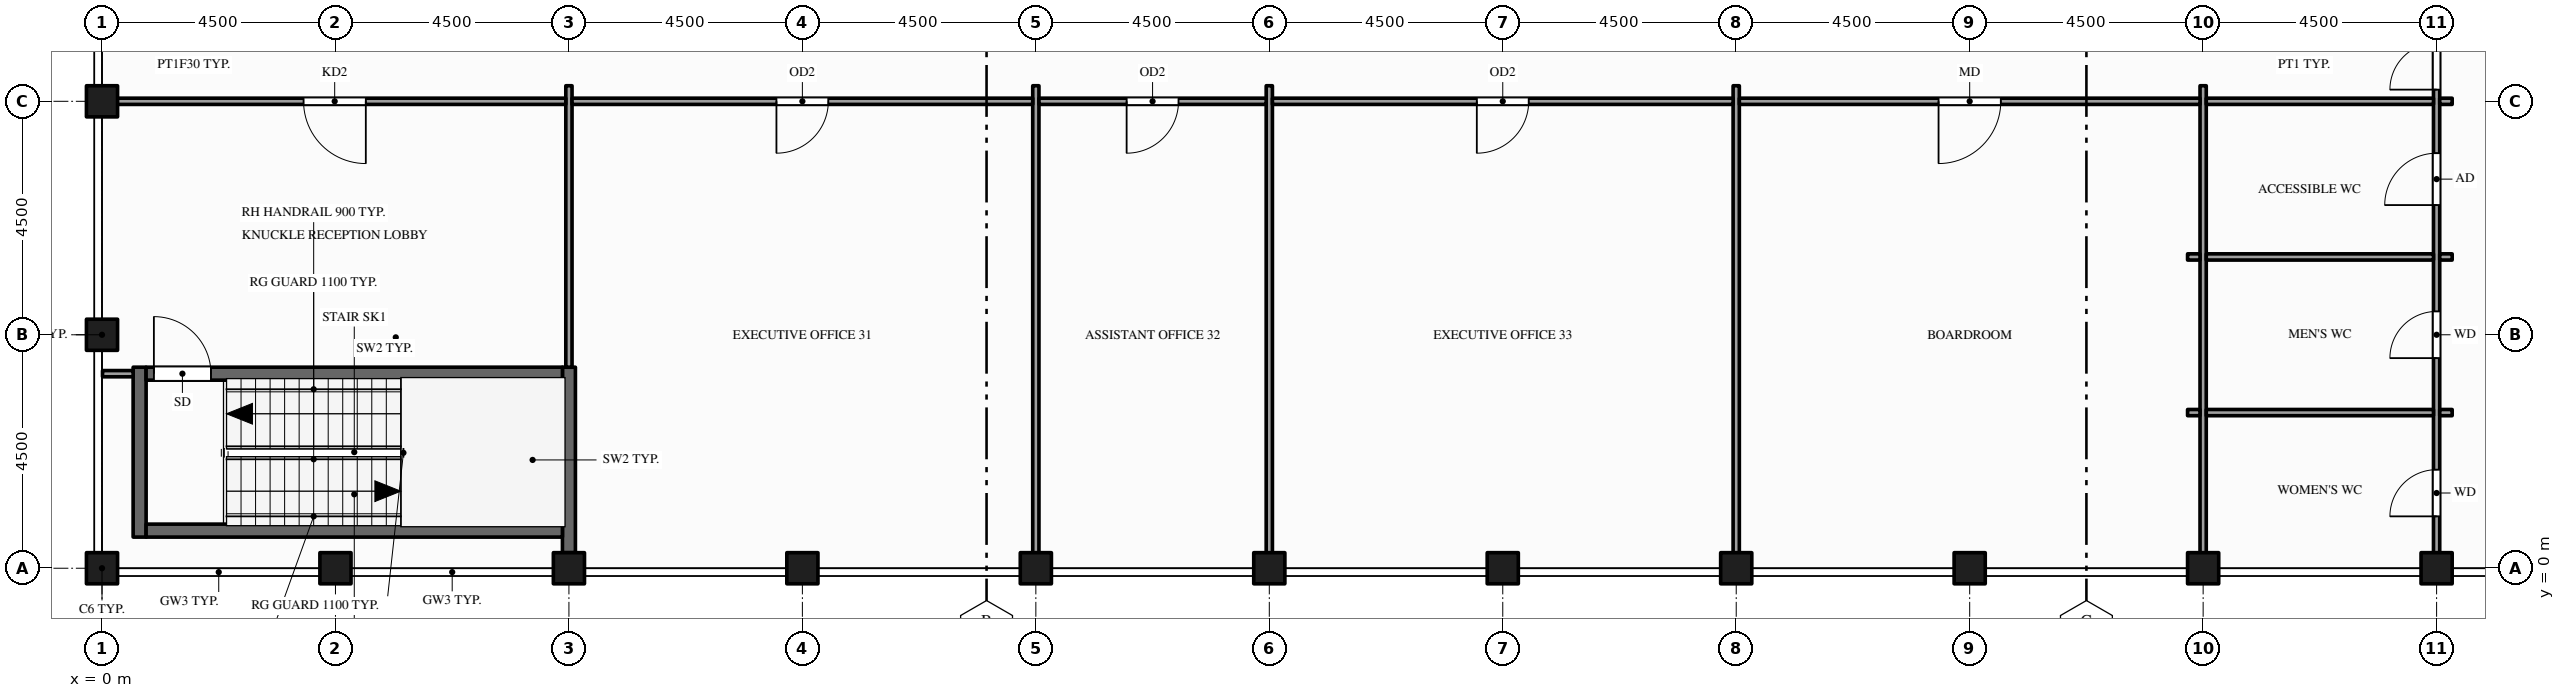
"""IFC4 building model, lengths in metres.
Left out: names, types, materials, properties, quantities, classifications, styles, units other than length and angle.
Written with IfcOpenShell. Run it as: python <this file> out.ifc"""

import sys

from ifc_helpers import new_model, si_unit, direction, frame, frame_2d, origin, origin_2d, place, context, subcontext, project, spatial, rectangle, hollow_rectangle, extrude, element, fill, save


model = new_model("IFC4")
c1 = context("Model", 3, precision=1e-05, world=origin(), true_north=direction((0.0, 1.0)))
c2 = subcontext(c1, "Body", "Model", "MODEL_VIEW")
j1 = project(units=[si_unit("LENGTHUNIT", "METRE"), si_unit("PLANEANGLEUNIT", "RADIAN")], contexts=[c1])
p1 = place(None, origin())
s1 = spatial("IfcSite", under=j1, at=p1, CompositionType="ELEMENT")
p2 = place(p1, origin())
s2 = spatial("IfcBuilding", under=s1, at=p2, CompositionType="ELEMENT")
p3 = place(p2, frame((0.0, 0.0, 309.5)))
s3 = spatial("IfcBuildingStorey", under=s2, at=p3, CompositionType="ELEMENT", Elevation=309.5)
for number, where, z_axis, x_axis in (
    (1, (0.0, 0.0, -0.15), (0.0, 0.0, 1.0), (1.0, 0.0, 0.0)),
    (2, (0.0, 4.5, -0.15), (0.0, 0.0, 1.0), (1.0, 0.0, 0.0)),
    (3, (0.0, 9.0, -0.15), (0.0, 0.0, 1.0), (1.0, 0.0, 0.0)),
    (4, (4.5, 0.0, -0.15), (0.0, 0.0, 1.0), (1.0, 0.0, 0.0)),
    (5, (9.0, 0.0, -0.15), (0.0, 0.0, 1.0), (1.0, 0.0, 0.0)),
    (6, (13.5, 0.0, -0.15), (0.0, 0.0, 1.0), (1.0, 0.0, 0.0)),
    (7, (18.0, 0.0, -0.15), (0.0, 0.0, 1.0), (1.0, 0.0, 0.0)),
    (8, (22.5, 0.0, -0.15), (0.0, 0.0, 1.0), (1.0, 0.0, 0.0)),
    (9, (27.0, 0.0, -0.15), (0.0, 0.0, 1.0), (1.0, 0.0, 0.0)),
    (10, (31.5, 0.0, -0.15), (0.0, 0.0, 1.0), (1.0, 0.0, 0.0)),
    (11, (36.0, 0.0, -0.15), (0.0, 0.0, 1.0), (1.0, 0.0, 0.0)),
    (12, (40.5, 0.0, -0.15), (0.0, 0.0, 1.0), (1.0, 0.0, 0.0)),
    (13, (45.0, 0.0, -0.15), (0.0, 0.0, 1.0), (1.0, 0.0, 0.0)),
):
    element("IfcColumn", number, at=place(p3, frame(where, z_axis=z_axis, x_axis=x_axis)), inside=s3, PredefinedType="COLUMN", context=c2, shape_type="SweptSolid", body=[
        extrude(hollow_rectangle(XDim=0.6, YDim=0.6, WallThickness=0.03, at=origin_2d()), origin(), (0.0, 0.0, 1.0), 4.5),
    ])
p4 = place(p3, frame((0.725, 0.6, 0.0), z_axis=(0.0, 0.0, 1.0), x_axis=(0.0, 1.0, 0.0)))
e14 = element("IfcWall", 14, at=p4, inside=s3, PredefinedType="SHEAR", context=c2, shape_type="SweptSolid", body=[
    extrude(rectangle(XDim=3.275, YDim=0.25, at=frame_2d((1.637, 0.0))), origin(), (0.0, 0.0, 1.0), 4.35),
])
p5 = place(p3, frame((9.0, 0.3, 0.0), z_axis=(0.0, 0.0, 1.0), x_axis=(0.0, 1.0, 0.0)))
e15 = element("IfcWall", 15, at=p5, inside=s3, PredefinedType="SHEAR", context=c2, shape_type="SweptSolid", body=[
    extrude(rectangle(XDim=3.575, YDim=0.25, at=frame_2d((1.788, 0.0))), origin(), (0.0, 0.0, 1.0), 4.35),
])
p6 = place(p3, frame((9.0, 3.875, 0.0), z_axis=(0.0, 0.0, 1.0), x_axis=(0.0, 1.0, 0.0)))
e16 = element("IfcWall", 16, at=p6, inside=s3, PredefinedType="PARTITIONING", context=c2, shape_type="SweptSolid", body=[
    extrude(rectangle(XDim=5.425, YDim=0.12, at=frame_2d((2.712, 0.0))), origin(), (0.0, 0.0, 1.0), 3.359),
])
for number, where, z_axis, x_axis in (
    (17, (18.0, 0.01, 0.0), (0.0, 0.0, 1.0), (0.0, 1.0, 0.0)),
    (18, (22.5, 0.01, 0.0), (0.0, 0.0, 1.0), (0.0, 1.0, 0.0)),
    (19, (31.5, 0.01, 0.0), (0.0, 0.0, 1.0), (0.0, 1.0, 0.0)),
    (20, (40.5, 0.01, 0.0), (0.0, 0.0, 1.0), (0.0, 1.0, 0.0)),
):
    element("IfcWall", number, at=place(p3, frame(where, z_axis=z_axis, x_axis=x_axis)), inside=s3, PredefinedType="PARTITIONING", context=c2, shape_type="SweptSolid", body=[
        extrude(rectangle(XDim=9.29, YDim=0.12, at=frame_2d((4.645, 0.0))), origin(), (0.0, 0.0, 1.0), 3.359),
    ])
p7 = place(p3, frame((45.0, 0.01, 0.0), z_axis=(0.0, 0.0, 1.0), x_axis=(0.0, 1.0, 0.0)))
e21 = element("IfcWall", 21, at=p7, inside=s3, PredefinedType="PARTITIONING", context=c2, shape_type="SweptSolid", body=[
    extrude(rectangle(XDim=22.48, YDim=0.12, at=frame_2d((11.24, 0.0))), origin(), (0.0, 0.0, 1.0), 3.359),
])
p8 = place(p7, frame((9.215, 0.0, 0.0)))
e22 = element("IfcOpeningElement", 22, at=p8, cuts=e21, PredefinedType="OPENING", context=c2, shape_type="SweptSolid", body=[
    extrude(rectangle(XDim=1.8, YDim=2.1, at=frame_2d((0.9, 1.05))), frame((0.0, 0.07, 0.0), z_axis=(0.0, -1.0, 0.0), x_axis=(1.0, 0.0, 0.0)), (0.0, 0.0, 1.0), 0.14),
])
p9 = place(p7, frame((0.99, 0.0, 0.0)))
e23 = element("IfcOpeningElement", 23, at=p9, cuts=e21, PredefinedType="OPENING", context=c2, shape_type="SweptSolid", body=[
    extrude(rectangle(XDim=0.9, YDim=2.1, at=frame_2d((0.45, 1.05))), frame((0.0, 0.07, 0.0), z_axis=(0.0, -1.0, 0.0), x_axis=(1.0, 0.0, 0.0)), (0.0, 0.0, 1.0), 0.14),
])
p10 = place(p7, frame((4.04, 0.0, 0.0)))
e24 = element("IfcOpeningElement", 24, at=p10, cuts=e21, PredefinedType="OPENING", context=c2, shape_type="SweptSolid", body=[
    extrude(rectangle(XDim=0.9, YDim=2.1, at=frame_2d((0.45, 1.05))), frame((0.0, 0.07, 0.0), z_axis=(0.0, -1.0, 0.0), x_axis=(1.0, 0.0, 0.0)), (0.0, 0.0, 1.0), 0.14),
])
p11 = place(p7, frame((6.99, 0.0, 0.0)))
e25 = element("IfcOpeningElement", 25, at=p11, cuts=e21, PredefinedType="OPENING", context=c2, shape_type="SweptSolid", body=[
    extrude(rectangle(XDim=1.0, YDim=2.1, at=frame_2d((0.5, 1.05))), frame((0.0, 0.07, 0.0), z_axis=(0.0, -1.0, 0.0), x_axis=(1.0, 0.0, 0.0)), (0.0, 0.0, 1.0), 0.14),
])
p12 = place(p3, frame((0.85, 0.725, 0.0), z_axis=(0.0, 0.0, 1.0), x_axis=(1.0, 0.0, 0.0)))
e26 = element("IfcWall", 26, at=p12, inside=s3, PredefinedType="SHEAR", context=c2, shape_type="SweptSolid", body=[
    extrude(rectangle(XDim=8.025, YDim=0.25, at=frame_2d((4.012, 0.0))), origin(), (0.0, 0.0, 1.0), 4.35),
])
p13 = place(p3, frame((40.2, 3.0, 0.0), z_axis=(0.0, 0.0, 1.0), x_axis=(1.0, 0.0, 0.0)))
e27 = element("IfcWall", 27, at=p13, inside=s3, PredefinedType="PARTITIONING", context=c2, shape_type="SweptSolid", body=[
    extrude(rectangle(XDim=0.24, YDim=0.12, at=frame_2d((0.12, 0.0))), origin(), (0.0, 0.0, 1.0), 3.359),
])
p14 = place(p3, frame((40.56, 3.0, 0.0), z_axis=(0.0, 0.0, 1.0), x_axis=(1.0, 0.0, 0.0)))
e28 = element("IfcWall", 28, at=p14, inside=s3, PredefinedType="PARTITIONING", context=c2, shape_type="SweptSolid", body=[
    extrude(rectangle(XDim=4.38, YDim=0.12, at=frame_2d((2.19, 0.0))), origin(), (0.0, 0.0, 1.0), 3.359),
])
p15 = place(p3, frame((45.06, 3.0, 0.0), z_axis=(0.0, 0.0, 1.0), x_axis=(1.0, 0.0, 0.0)))
e29 = element("IfcWall", 29, at=p15, inside=s3, PredefinedType="PARTITIONING", context=c2, shape_type="SweptSolid", body=[
    extrude(rectangle(XDim=0.24, YDim=0.12, at=frame_2d((0.12, 0.0))), origin(), (0.0, 0.0, 1.0), 3.359),
])
p16 = place(p3, frame((0.01, 3.75, 0.0), z_axis=(0.0, 0.0, 1.0), x_axis=(1.0, 0.0, 0.0)))
e30 = element("IfcWall", 30, at=p16, inside=s3, PredefinedType="PARTITIONING", context=c2, shape_type="SweptSolid", body=[
    extrude(rectangle(XDim=0.59, YDim=0.12, at=frame_2d((0.295, 0.0))), origin(), (0.0, 0.0, 1.0), 3.672),
])
p17 = place(p3, frame((0.85, 3.75, 0.0), z_axis=(0.0, 0.0, 1.0), x_axis=(1.0, 0.0, 0.0)))
e31 = element("IfcWall", 31, at=p17, inside=s3, PredefinedType="SHEAR", context=c2, shape_type="SweptSolid", body=[
    extrude(rectangle(XDim=8.025, YDim=0.25, at=frame_2d((4.012, 0.0))), origin(), (0.0, 0.0, 1.0), 4.35),
])
p18 = place(p17, frame((0.15, 0.0, 0.0)))
e32 = element("IfcOpeningElement", 32, at=p18, cuts=e31, PredefinedType="OPENING", context=c2, shape_type="SweptSolid", body=[
    extrude(rectangle(XDim=1.1, YDim=2.1, at=frame_2d((0.55, 1.05))), frame((0.0, 0.135, 0.0), z_axis=(0.0, -1.0, 0.0), x_axis=(1.0, 0.0, 0.0)), (0.0, 0.0, 1.0), 0.27),
])
p19 = place(p3, frame((40.2, 6.0, 0.0), z_axis=(0.0, 0.0, 1.0), x_axis=(1.0, 0.0, 0.0)))
e33 = element("IfcWall", 33, at=p19, inside=s3, PredefinedType="PARTITIONING", context=c2, shape_type="SweptSolid", body=[
    extrude(rectangle(XDim=0.24, YDim=0.12, at=frame_2d((0.12, 0.0))), origin(), (0.0, 0.0, 1.0), 3.359),
])
p20 = place(p3, frame((40.56, 6.0, 0.0), z_axis=(0.0, 0.0, 1.0), x_axis=(1.0, 0.0, 0.0)))
e34 = element("IfcWall", 34, at=p20, inside=s3, PredefinedType="PARTITIONING", context=c2, shape_type="SweptSolid", body=[
    extrude(rectangle(XDim=4.38, YDim=0.12, at=frame_2d((2.19, 0.0))), origin(), (0.0, 0.0, 1.0), 3.359),
])
p21 = place(p3, frame((45.06, 6.0, 0.0), z_axis=(0.0, 0.0, 1.0), x_axis=(1.0, 0.0, 0.0)))
e35 = element("IfcWall", 35, at=p21, inside=s3, PredefinedType="PARTITIONING", context=c2, shape_type="SweptSolid", body=[
    extrude(rectangle(XDim=0.24, YDim=0.12, at=frame_2d((0.12, 0.0))), origin(), (0.0, 0.0, 1.0), 3.359),
])
p22 = place(p3, frame((0.01, 9.0, 0.0), z_axis=(0.0, 0.0, 1.0), x_axis=(1.0, 0.0, 0.0)))
e36 = element("IfcWall", 36, at=p22, inside=s3, PredefinedType="PARTITIONING", context=c2, shape_type="SweptSolid", body=[
    extrude(rectangle(XDim=8.93, YDim=0.12, at=frame_2d((4.465, 0.0))), origin(), (0.0, 0.0, 1.0), 3.359),
])
p23 = place(p22, frame((3.875, 0.0, 0.0)))
e37 = element("IfcOpeningElement", 37, at=p23, cuts=e36, PredefinedType="OPENING", context=c2, shape_type="SweptSolid", body=[
    extrude(rectangle(XDim=1.2, YDim=2.1, at=frame_2d((0.6, 1.05))), frame((0.0, 0.07, 0.0), z_axis=(0.0, -1.0, 0.0), x_axis=(1.0, 0.0, 0.0)), (0.0, 0.0, 1.0), 0.14),
])
p24 = place(p3, frame((9.06, 9.0, 0.0), z_axis=(0.0, 0.0, 1.0), x_axis=(1.0, 0.0, 0.0)))
e38 = element("IfcWall", 38, at=p24, inside=s3, PredefinedType="PARTITIONING", context=c2, shape_type="SweptSolid", body=[
    extrude(rectangle(XDim=8.88, YDim=0.12, at=frame_2d((4.44, 0.0))), origin(), (0.0, 0.0, 1.0), 3.359),
])
p25 = place(p24, frame((3.94, 0.0, 0.0)))
e39 = element("IfcOpeningElement", 39, at=p25, cuts=e38, PredefinedType="OPENING", context=c2, shape_type="SweptSolid", body=[
    extrude(rectangle(XDim=1.0, YDim=2.1, at=frame_2d((0.5, 1.05))), frame((0.0, 0.07, 0.0), z_axis=(0.0, -1.0, 0.0), x_axis=(1.0, 0.0, 0.0)), (0.0, 0.0, 1.0), 0.14),
])
p26 = place(p3, frame((18.06, 9.0, 0.0), z_axis=(0.0, 0.0, 1.0), x_axis=(1.0, 0.0, 0.0)))
e40 = element("IfcWall", 40, at=p26, inside=s3, PredefinedType="PARTITIONING", context=c2, shape_type="SweptSolid", body=[
    extrude(rectangle(XDim=4.38, YDim=0.12, at=frame_2d((2.19, 0.0))), origin(), (0.0, 0.0, 1.0), 3.359),
])
p27 = place(p26, frame((1.69, 0.0, 0.0)))
e41 = element("IfcOpeningElement", 41, at=p27, cuts=e40, PredefinedType="OPENING", context=c2, shape_type="SweptSolid", body=[
    extrude(rectangle(XDim=1.0, YDim=2.1, at=frame_2d((0.5, 1.05))), frame((0.0, 0.07, 0.0), z_axis=(0.0, -1.0, 0.0), x_axis=(1.0, 0.0, 0.0)), (0.0, 0.0, 1.0), 0.14),
])
p28 = place(p3, frame((22.56, 9.0, 0.0), z_axis=(0.0, 0.0, 1.0), x_axis=(1.0, 0.0, 0.0)))
e42 = element("IfcWall", 42, at=p28, inside=s3, PredefinedType="PARTITIONING", context=c2, shape_type="SweptSolid", body=[
    extrude(rectangle(XDim=8.88, YDim=0.12, at=frame_2d((4.44, 0.0))), origin(), (0.0, 0.0, 1.0), 3.359),
])
p29 = place(p28, frame((3.94, 0.0, 0.0)))
e43 = element("IfcOpeningElement", 43, at=p29, cuts=e42, PredefinedType="OPENING", context=c2, shape_type="SweptSolid", body=[
    extrude(rectangle(XDim=1.0, YDim=2.1, at=frame_2d((0.5, 1.05))), frame((0.0, 0.07, 0.0), z_axis=(0.0, -1.0, 0.0), x_axis=(1.0, 0.0, 0.0)), (0.0, 0.0, 1.0), 0.14),
])
p30 = place(p3, frame((31.56, 9.0, 0.0), z_axis=(0.0, 0.0, 1.0), x_axis=(1.0, 0.0, 0.0)))
e44 = element("IfcWall", 44, at=p30, inside=s3, PredefinedType="PARTITIONING", context=c2, shape_type="SweptSolid", body=[
    extrude(rectangle(XDim=8.88, YDim=0.12, at=frame_2d((4.44, 0.0))), origin(), (0.0, 0.0, 1.0), 3.359),
])
p31 = place(p30, frame((3.84, 0.0, 0.0)))
e45 = element("IfcOpeningElement", 45, at=p31, cuts=e44, PredefinedType="OPENING", context=c2, shape_type="SweptSolid", body=[
    extrude(rectangle(XDim=1.2, YDim=2.1, at=frame_2d((0.6, 1.05))), frame((0.0, 0.07, 0.0), z_axis=(0.0, -1.0, 0.0), x_axis=(1.0, 0.0, 0.0)), (0.0, 0.0, 1.0), 0.14),
])
p32 = place(p3, frame((40.56, 9.0, 0.0), z_axis=(0.0, 0.0, 1.0), x_axis=(1.0, 0.0, 0.0)))
e46 = element("IfcWall", 46, at=p32, inside=s3, PredefinedType="PARTITIONING", context=c2, shape_type="SweptSolid", body=[
    extrude(rectangle(XDim=4.38, YDim=0.12, at=frame_2d((2.19, 0.0))), origin(), (0.0, 0.0, 1.0), 3.359),
])
p33 = place(p3, frame((45.06, 9.0, 0.0), z_axis=(0.0, 0.0, 1.0), x_axis=(1.0, 0.0, 0.0)))
e47 = element("IfcWall", 47, at=p33, inside=s3, PredefinedType="PARTITIONING", context=c2, shape_type="SweptSolid", body=[
    extrude(rectangle(XDim=0.24, YDim=0.12, at=frame_2d((0.12, 0.0))), origin(), (0.0, 0.0, 1.0), 3.359),
])
p34 = place(p8, origin())
e48 = element("IfcDoor", 48, at=p34, inside=s3, OperationType="DOUBLE_DOOR_SINGLE_SWING", PredefinedType="DOOR", context=c2, shape_type="SweptSolid", body=[
    extrude(rectangle(XDim=1.8, YDim=2.1, at=frame_2d((0.9, 1.05))), frame((0.0, 0.025, 0.0), z_axis=(0.0, -1.0, 0.0), x_axis=(1.0, 0.0, 0.0)), (0.0, 0.0, 1.0), 0.05),
])
fill(e22, e48)
p35 = place(p18, origin())
e49 = element("IfcDoor", 49, at=p35, inside=s3, OperationType="SINGLE_SWING_LEFT", PredefinedType="DOOR", context=c2, shape_type="SweptSolid", body=[
    extrude(rectangle(XDim=1.1, YDim=2.1, at=frame_2d((0.55, 1.05))), frame((0.0, 0.025, 0.0), z_axis=(0.0, -1.0, 0.0), x_axis=(1.0, 0.0, 0.0)), (0.0, 0.0, 1.0), 0.05),
])
fill(e32, e49)
p36 = place(p23, origin())
e50 = element("IfcDoor", 50, at=p36, inside=s3, OperationType="SINGLE_SWING_RIGHT", PredefinedType="DOOR", context=c2, shape_type="SweptSolid", body=[
    extrude(rectangle(XDim=1.2, YDim=2.1, at=frame_2d((0.6, 1.05))), frame((0.0, 0.025, 0.0), z_axis=(0.0, -1.0, 0.0), x_axis=(1.0, 0.0, 0.0)), (0.0, 0.0, 1.0), 0.05),
])
fill(e37, e50)
p37 = place(p25, origin())
e51 = element("IfcDoor", 51, at=p37, inside=s3, OperationType="SINGLE_SWING_LEFT", PredefinedType="DOOR", context=c2, shape_type="SweptSolid", body=[
    extrude(rectangle(XDim=1.0, YDim=2.1, at=frame_2d((0.5, 1.05))), frame((0.0, 0.025, 0.0), z_axis=(0.0, -1.0, 0.0), x_axis=(1.0, 0.0, 0.0)), (0.0, 0.0, 1.0), 0.05),
])
fill(e39, e51)
p38 = place(p27, origin())
e52 = element("IfcDoor", 52, at=p38, inside=s3, OperationType="SINGLE_SWING_LEFT", PredefinedType="DOOR", context=c2, shape_type="SweptSolid", body=[
    extrude(rectangle(XDim=1.0, YDim=2.1, at=frame_2d((0.5, 1.05))), frame((0.0, 0.025, 0.0), z_axis=(0.0, -1.0, 0.0), x_axis=(1.0, 0.0, 0.0)), (0.0, 0.0, 1.0), 0.05),
])
fill(e41, e52)
p39 = place(p29, origin())
e53 = element("IfcDoor", 53, at=p39, inside=s3, OperationType="SINGLE_SWING_LEFT", PredefinedType="DOOR", context=c2, shape_type="SweptSolid", body=[
    extrude(rectangle(XDim=1.0, YDim=2.1, at=frame_2d((0.5, 1.05))), frame((0.0, 0.025, 0.0), z_axis=(0.0, -1.0, 0.0), x_axis=(1.0, 0.0, 0.0)), (0.0, 0.0, 1.0), 0.05),
])
fill(e43, e53)
p40 = place(p31, origin())
e54 = element("IfcDoor", 54, at=p40, inside=s3, OperationType="SINGLE_SWING_LEFT", PredefinedType="DOOR", context=c2, shape_type="SweptSolid", body=[
    extrude(rectangle(XDim=1.2, YDim=2.1, at=frame_2d((0.6, 1.05))), frame((0.0, 0.025, 0.0), z_axis=(0.0, -1.0, 0.0), x_axis=(1.0, 0.0, 0.0)), (0.0, 0.0, 1.0), 0.05),
])
fill(e45, e54)
p41 = place(p9, origin())
e55 = element("IfcDoor", 55, at=p41, inside=s3, OperationType="SINGLE_SWING_LEFT", PredefinedType="DOOR", context=c2, shape_type="SweptSolid", body=[
    extrude(rectangle(XDim=0.9, YDim=2.1, at=frame_2d((0.45, 1.05))), frame((0.0, 0.025, 0.0), z_axis=(0.0, -1.0, 0.0), x_axis=(1.0, 0.0, 0.0)), (0.0, 0.0, 1.0), 0.05),
])
fill(e23, e55)
p42 = place(p10, origin())
e56 = element("IfcDoor", 56, at=p42, inside=s3, OperationType="SINGLE_SWING_LEFT", PredefinedType="DOOR", context=c2, shape_type="SweptSolid", body=[
    extrude(rectangle(XDim=0.9, YDim=2.1, at=frame_2d((0.45, 1.05))), frame((0.0, 0.025, 0.0), z_axis=(0.0, -1.0, 0.0), x_axis=(1.0, 0.0, 0.0)), (0.0, 0.0, 1.0), 0.05),
])
fill(e24, e56)
p43 = place(p11, origin())
e57 = element("IfcDoor", 57, at=p43, inside=s3, OperationType="SINGLE_SWING_LEFT", PredefinedType="DOOR", context=c2, shape_type="SweptSolid", body=[
    extrude(rectangle(XDim=1.0, YDim=2.1, at=frame_2d((0.5, 1.05))), frame((0.0, 0.025, 0.0), z_axis=(0.0, -1.0, 0.0), x_axis=(1.0, 0.0, 0.0)), (0.0, 0.0, 1.0), 0.05),
])
fill(e25, e57)
save(model, sys.argv[1])
